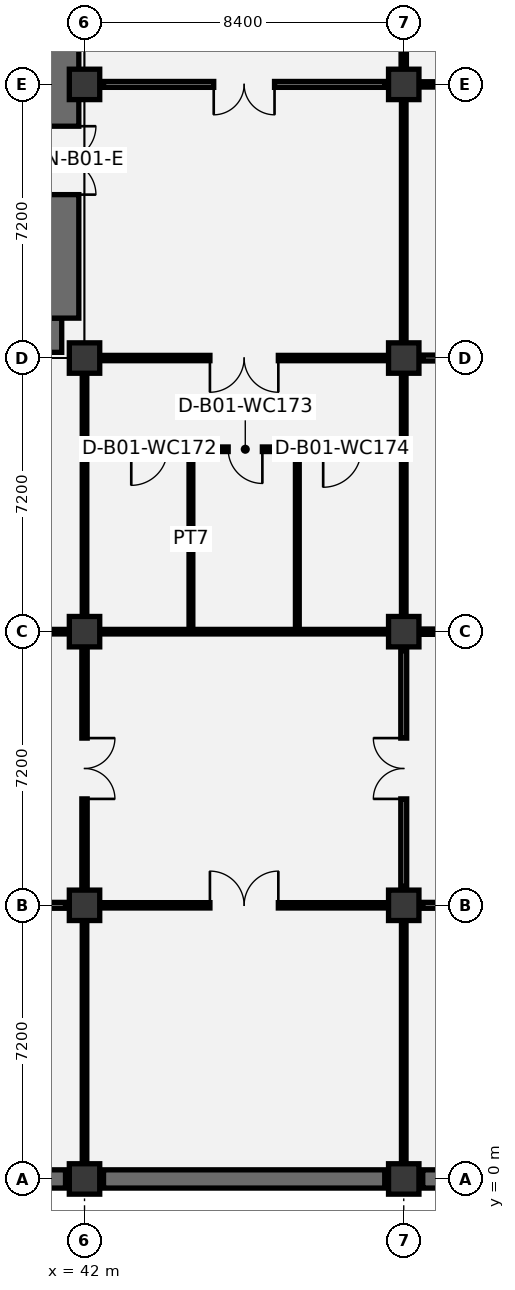
"""IFC4 building model, lengths in metres.
Left out: names, types, materials, properties, quantities, classifications, styles, units other than length and angle.
Written with IfcOpenShell. Run it as: python <this file> out.ifc"""

import sys

from ifc_helpers import new_model, si_unit, direction, frame, frame_2d, origin, origin_2d, place, context, subcontext, project, spatial, rectangle, extrude, element, fill, save


model = new_model("IFC4")
c1 = context("Model", 3, precision=1e-05, world=origin(), true_north=direction((0.0, 1.0)))
c2 = subcontext(c1, "Body", "Model", "MODEL_VIEW")
j1 = project(units=[si_unit("LENGTHUNIT", "METRE"), si_unit("PLANEANGLEUNIT", "RADIAN")], contexts=[c1])
p1 = place(None, origin())
s1 = spatial("IfcSite", under=j1, at=p1, CompositionType="ELEMENT")
p2 = place(p1, origin())
s2 = spatial("IfcBuilding", under=s1, at=p2, CompositionType="ELEMENT")
p3 = place(p2, frame((0.0, 0.0, -4.8)))
s3 = spatial("IfcBuildingStorey", under=s2, at=p3, CompositionType="ELEMENT", Elevation=-4.8)
for number, where, z_axis, x_axis in (
    (1, (42.0, 0.0, 0.0), (0.0, 0.0, 1.0), (1.0, 0.0, 0.0)),
    (2, (42.0, 7.2, 0.0), (0.0, 0.0, 1.0), (1.0, 0.0, 0.0)),
    (3, (42.0, 14.4, 0.0), (0.0, 0.0, 1.0), (1.0, 0.0, 0.0)),
    (4, (42.0, 21.6, 0.0), (0.0, 0.0, 1.0), (1.0, 0.0, 0.0)),
    (5, (42.0, 28.8, 0.0), (0.0, 0.0, 1.0), (1.0, 0.0, 0.0)),
    (6, (50.4, 0.0, 0.0), (0.0, 0.0, 1.0), (1.0, 0.0, 0.0)),
    (7, (50.4, 7.2, 0.0), (0.0, 0.0, 1.0), (1.0, 0.0, 0.0)),
    (8, (50.4, 14.4, 0.0), (0.0, 0.0, 1.0), (1.0, 0.0, 0.0)),
    (9, (50.4, 21.6, 0.0), (0.0, 0.0, 1.0), (1.0, 0.0, 0.0)),
    (10, (50.4, 28.8, 0.0), (0.0, 0.0, 1.0), (1.0, 0.0, 0.0)),
):
    element("IfcColumn", number, at=place(p3, frame(where, z_axis=z_axis, x_axis=x_axis)), inside=s3, PredefinedType="COLUMN", context=c2, shape_type="SweptSolid", body=[
        extrude(rectangle(XDim=0.8, YDim=0.8, at=origin_2d()), origin(), (0.0, 0.0, 1.0), 4.8),
    ])
for number, where, z_axis, x_axis in (
    (11, (34.1, 0.0, 0.0), (0.0, 0.0, 1.0), (1.0, 0.0, 0.0)),
    (12, (42.5, 0.0, 0.0), (0.0, 0.0, 1.0), (1.0, 0.0, 0.0)),
):
    element("IfcWall", number, at=place(p3, frame(where, z_axis=z_axis, x_axis=x_axis)), inside=s3, PredefinedType="USERDEFINED", context=c2, shape_type="SweptSolid", body=[
        extrude(rectangle(XDim=7.4, YDim=0.48, at=frame_2d((3.7, 0.0))), origin(), (0.0, 0.0, 1.0), 4.45),
    ])
p4 = place(p3, frame((50.9, 0.0, 0.0), z_axis=(0.0, 0.0, 1.0), x_axis=(1.0, 0.0, 0.0)))
e13 = element("IfcWall", 13, at=p4, inside=s3, PredefinedType="USERDEFINED", context=c2, shape_type="SweptSolid", body=[
    extrude(rectangle(XDim=7.4, YDim=0.48, at=frame_2d((3.7, 0.0))), origin(), (0.0, 0.0, 1.0), 4.45),
])
p5 = place(p3, frame((17.4, 22.2, 0.0), z_axis=(0.0, 0.0, 1.0), x_axis=(1.0, 0.0, 0.0)))
e14 = element("IfcWall", 14, at=p5, inside=s3, PredefinedType="SOLIDWALL", context=c2, shape_type="SweptSolid", body=[
    extrude(rectangle(XDim=24.0, YDim=0.9, at=frame_2d((12.0, 0.0))), origin(), (0.0, 0.0, 1.0), 4.8),
])
p6 = place(p5, frame((2.6, 0.0, 0.85)))
e15 = element("IfcOpeningElement", 15, at=p6, cuts=e14, PredefinedType="OPENING", context=c2, shape_type="SweptSolid", body=[
    extrude(rectangle(XDim=5.2, YDim=2.9, at=frame_2d((2.6, 1.45))), frame((0.0, 0.46, 0.0), z_axis=(0.0, -1.0, 0.0), x_axis=(1.0, 0.0, 0.0)), (0.0, 0.0, 1.0), 0.92),
])
p7 = place(p5, frame((14.8, 0.0, 0.85)))
e16 = element("IfcOpeningElement", 16, at=p7, cuts=e14, PredefinedType="OPENING", context=c2, shape_type="SweptSolid", body=[
    extrude(rectangle(XDim=5.2, YDim=2.9, at=frame_2d((2.6, 1.45))), frame((0.0, 0.46, 0.0), z_axis=(0.0, -1.0, 0.0), x_axis=(1.0, 0.0, 0.0)), (0.0, 0.0, 1.0), 0.92),
])
p8 = place(p3, frame((41.4, 22.65, 0.0), z_axis=(0.0, 0.0, 1.0), x_axis=(0.0, 1.0, 0.0)))
e17 = element("IfcWall", 17, at=p8, inside=s3, PredefinedType="SOLIDWALL", context=c2, shape_type="SweptSolid", body=[
    extrude(rectangle(XDim=12.3, YDim=0.9, at=frame_2d((6.15, 0.0))), origin(), (0.0, 0.0, 1.0), 4.8),
])
p9 = place(p8, frame((3.25, 0.0, 0.0)))
e18 = element("IfcOpeningElement", 18, at=p9, cuts=e17, PredefinedType="OPENING", context=c2, shape_type="SweptSolid", body=[
    extrude(rectangle(XDim=1.8, YDim=2.2, at=frame_2d((0.9, 1.1))), frame((0.0, 0.46, 0.0), z_axis=(0.0, -1.0, 0.0), x_axis=(1.0, 0.0, 0.0)), (0.0, 0.0, 1.0), 0.92),
])
p10 = place(p3, frame((42.15, 19.2, 0.0), z_axis=(0.0, 0.0, 1.0), x_axis=(1.0, 0.0, 0.0)))
e19 = element("IfcWall", 19, at=p10, inside=s3, PredefinedType="PARTITIONING", context=c2, shape_type="SweptSolid", body=[
    extrude(rectangle(XDim=8.1, YDim=0.12, at=frame_2d((4.05, 0.0))), origin(), (0.0, 0.0, 1.0), 4.45),
])
p11 = place(p10, frame((1.08, 0.0, 0.0)))
e20 = element("IfcOpeningElement", 20, at=p11, cuts=e19, PredefinedType="OPENING", context=c2, shape_type="SweptSolid", body=[
    extrude(rectangle(XDim=0.95, YDim=2.1, at=frame_2d((0.475, 1.05))), frame((0.0, 0.07, 0.0), z_axis=(0.0, -1.0, 0.0), x_axis=(1.0, 0.0, 0.0)), (0.0, 0.0, 1.0), 0.14),
])
p12 = place(p10, frame((3.63, 0.0, 0.0)))
e21 = element("IfcOpeningElement", 21, at=p12, cuts=e19, PredefinedType="OPENING", context=c2, shape_type="SweptSolid", body=[
    extrude(rectangle(XDim=0.9, YDim=2.1, at=frame_2d((0.45, 1.05))), frame((0.0, 0.07, 0.0), z_axis=(0.0, -1.0, 0.0), x_axis=(1.0, 0.0, 0.0)), (0.0, 0.0, 1.0), 0.14),
])
p13 = place(p10, frame((6.13, 0.0, 0.0)))
e22 = element("IfcOpeningElement", 22, at=p13, cuts=e19, PredefinedType="OPENING", context=c2, shape_type="SweptSolid", body=[
    extrude(rectangle(XDim=1.0, YDim=2.1, at=frame_2d((0.5, 1.05))), frame((0.0, 0.07, 0.0), z_axis=(0.0, -1.0, 0.0), x_axis=(1.0, 0.0, 0.0)), (0.0, 0.0, 1.0), 0.14),
])
for number, where, z_axis, x_axis in (
    (23, (44.8, 14.55, 0.0), (0.0, 0.0, 1.0), (0.0, 1.0, 0.0)),
    (24, (47.6, 14.55, 0.0), (0.0, 0.0, 1.0), (0.0, 1.0, 0.0)),
):
    element("IfcWall", number, at=place(p3, frame(where, z_axis=z_axis, x_axis=x_axis)), inside=s3, PredefinedType="PARTITIONING", context=c2, shape_type="SweptSolid", body=[
        extrude(rectangle(XDim=4.59, YDim=0.1, at=frame_2d((2.295, 0.0))), origin(), (0.0, 0.0, 1.0), 4.45),
    ])
p14 = place(p3, frame((42.0, 0.5, 0.0), z_axis=(0.0, 0.0, 1.0), x_axis=(0.0, 1.0, 0.0)))
e25 = element("IfcWall", 25, at=p14, inside=s3, PredefinedType="PARTITIONING", context=c2, shape_type="SweptSolid", body=[
    extrude(rectangle(XDim=6.2, YDim=0.12, at=frame_2d((3.1, 0.0))), origin(), (0.0, 0.0, 1.0), 3.645),
])
p15 = place(p3, frame((34.1, 7.2, 0.0), z_axis=(0.0, 0.0, 1.0), x_axis=(1.0, 0.0, 0.0)))
e26 = element("IfcWall", 26, at=p15, inside=s3, PredefinedType="PARTITIONING", context=c2, shape_type="SweptSolid", body=[
    extrude(rectangle(XDim=7.4, YDim=0.155, at=frame_2d((3.7, 0.0))), origin(), (0.0, 0.0, 1.0), 3.545),
])
p16 = place(p15, frame((2.8, 0.0, 0.0)))
e27 = element("IfcOpeningElement", 27, at=p16, cuts=e26, PredefinedType="OPENING", context=c2, shape_type="SweptSolid", body=[
    extrude(rectangle(XDim=1.8, YDim=2.25, at=frame_2d((0.9, 1.125))), frame((0.0, 0.087, 0.0), z_axis=(0.0, -1.0, 0.0), x_axis=(1.0, 0.0, 0.0)), (0.0, 0.0, 1.0), 0.175),
])
p17 = place(p3, frame((42.0, 7.7, 0.0), z_axis=(0.0, 0.0, 1.0), x_axis=(0.0, 1.0, 0.0)))
e28 = element("IfcWall", 28, at=p17, inside=s3, PredefinedType="PARTITIONING", context=c2, shape_type="SweptSolid", body=[
    extrude(rectangle(XDim=6.2, YDim=0.14, at=frame_2d((3.1, 0.0))), origin(), (0.0, 0.0, 1.0), 3.645),
])
p18 = place(p17, frame((2.3, 0.0, 0.0)))
e29 = element("IfcOpeningElement", 29, at=p18, cuts=e28, PredefinedType="OPENING", context=c2, shape_type="SweptSolid", body=[
    extrude(rectangle(XDim=1.6, YDim=2.2, at=frame_2d((0.8, 1.1))), frame((0.0, 0.08, 0.0), z_axis=(0.0, -1.0, 0.0), x_axis=(1.0, 0.0, 0.0)), (0.0, 0.0, 1.0), 0.16),
])
p19 = place(p3, frame((34.1, 14.4, 0.0), z_axis=(0.0, 0.0, 1.0), x_axis=(1.0, 0.0, 0.0)))
e30 = element("IfcWall", 30, at=p19, inside=s3, PredefinedType="PARTITIONING", context=c2, shape_type="SweptSolid", body=[
    extrude(rectangle(XDim=7.4, YDim=0.12, at=frame_2d((3.7, 0.0))), origin(), (0.0, 0.0, 1.0), 3.545),
])
p20 = place(p3, frame((42.0, 14.9, 0.0), z_axis=(0.0, 0.0, 1.0), x_axis=(0.0, 1.0, 0.0)))
e31 = element("IfcWall", 31, at=p20, inside=s3, PredefinedType="PARTITIONING", context=c2, shape_type="SweptSolid", body=[
    extrude(rectangle(XDim=6.2, YDim=0.12, at=frame_2d((3.1, 0.0))), origin(), (0.0, 0.0, 1.0), 3.645),
])
p21 = place(p3, frame((50.4, 0.5, 0.0), z_axis=(0.0, 0.0, 1.0), x_axis=(0.0, 1.0, 0.0)))
e32 = element("IfcWall", 32, at=p21, inside=s3, PredefinedType="PARTITIONING", context=c2, shape_type="SweptSolid", body=[
    extrude(rectangle(XDim=6.2, YDim=0.12, at=frame_2d((3.1, 0.0))), origin(), (0.0, 0.0, 1.0), 3.645),
])
p22 = place(p3, frame((42.5, 7.2, 0.0), z_axis=(0.0, 0.0, 1.0), x_axis=(1.0, 0.0, 0.0)))
e33 = element("IfcWall", 33, at=p22, inside=s3, PredefinedType="PARTITIONING", context=c2, shape_type="SweptSolid", body=[
    extrude(rectangle(XDim=7.4, YDim=0.14, at=frame_2d((3.7, 0.0))), origin(), (0.0, 0.0, 1.0), 3.545),
])
p23 = place(p22, frame((2.8, 0.0, 0.0)))
e34 = element("IfcOpeningElement", 34, at=p23, cuts=e33, PredefinedType="OPENING", context=c2, shape_type="SweptSolid", body=[
    extrude(rectangle(XDim=1.8, YDim=2.25, at=frame_2d((0.9, 1.125))), frame((0.0, 0.08, 0.0), z_axis=(0.0, -1.0, 0.0), x_axis=(1.0, 0.0, 0.0)), (0.0, 0.0, 1.0), 0.16),
])
p24 = place(p3, frame((50.4, 7.7, 0.0), z_axis=(0.0, 0.0, 1.0), x_axis=(0.0, 1.0, 0.0)))
e35 = element("IfcWall", 35, at=p24, inside=s3, PredefinedType="PARTITIONING", context=c2, shape_type="SweptSolid", body=[
    extrude(rectangle(XDim=6.2, YDim=0.155, at=frame_2d((3.1, 0.0))), origin(), (0.0, 0.0, 1.0), 3.645),
])
p25 = place(p24, frame((2.3, 0.0, 0.0)))
e36 = element("IfcOpeningElement", 36, at=p25, cuts=e35, PredefinedType="OPENING", context=c2, shape_type="SweptSolid", body=[
    extrude(rectangle(XDim=1.6, YDim=2.2, at=frame_2d((0.8, 1.1))), frame((0.0, 0.087, 0.0), z_axis=(0.0, -1.0, 0.0), x_axis=(1.0, 0.0, 0.0)), (0.0, 0.0, 1.0), 0.175),
])
p26 = place(p3, frame((42.5, 14.4, 0.0), z_axis=(0.0, 0.0, 1.0), x_axis=(1.0, 0.0, 0.0)))
e37 = element("IfcWall", 37, at=p26, inside=s3, PredefinedType="PARTITIONING", context=c2, shape_type="SweptSolid", body=[
    extrude(rectangle(XDim=7.4, YDim=0.12, at=frame_2d((3.7, 0.0))), origin(), (0.0, 0.0, 1.0), 3.545),
])
p27 = place(p3, frame((50.4, 14.9, 0.0), z_axis=(0.0, 0.0, 1.0), x_axis=(0.0, 1.0, 0.0)))
e38 = element("IfcWall", 38, at=p27, inside=s3, PredefinedType="PARTITIONING", context=c2, shape_type="SweptSolid", body=[
    extrude(rectangle(XDim=6.2, YDim=0.12, at=frame_2d((3.1, 0.0))), origin(), (0.0, 0.0, 1.0), 3.645),
])
p28 = place(p3, frame((42.5, 21.6, 0.0), z_axis=(0.0, 0.0, 1.0), x_axis=(1.0, 0.0, 0.0)))
e39 = element("IfcWall", 39, at=p28, inside=s3, PredefinedType="PARTITIONING", context=c2, shape_type="SweptSolid", body=[
    extrude(rectangle(XDim=7.4, YDim=0.14, at=frame_2d((3.7, 0.0))), origin(), (0.0, 0.0, 1.0), 3.545),
])
p29 = place(p28, frame((2.8, 0.0, 0.0)))
e40 = element("IfcOpeningElement", 40, at=p29, cuts=e39, PredefinedType="OPENING", context=c2, shape_type="SweptSolid", body=[
    extrude(rectangle(XDim=1.8, YDim=2.25, at=frame_2d((0.9, 1.125))), frame((0.0, 0.08, 0.0), z_axis=(0.0, -1.0, 0.0), x_axis=(1.0, 0.0, 0.0)), (0.0, 0.0, 1.0), 0.16),
])
p30 = place(p3, frame((50.4, 22.1, 0.0), z_axis=(0.0, 0.0, 1.0), x_axis=(0.0, 1.0, 0.0)))
e41 = element("IfcWall", 41, at=p30, inside=s3, PredefinedType="PARTITIONING", context=c2, shape_type="SweptSolid", body=[
    extrude(rectangle(XDim=6.2, YDim=0.12, at=frame_2d((3.1, 0.0))), origin(), (0.0, 0.0, 1.0), 3.645),
])
p31 = place(p3, frame((42.5, 28.8, 0.0), z_axis=(0.0, 0.0, 1.0), x_axis=(1.0, 0.0, 0.0)))
e42 = element("IfcWall", 42, at=p31, inside=s3, PredefinedType="PARTITIONING", context=c2, shape_type="SweptSolid", body=[
    extrude(rectangle(XDim=7.4, YDim=0.155, at=frame_2d((3.7, 0.0))), origin(), (0.0, 0.0, 1.0), 3.545),
])
p32 = place(p31, frame((2.9, 0.0, 0.0)))
e43 = element("IfcOpeningElement", 43, at=p32, cuts=e42, PredefinedType="OPENING", context=c2, shape_type="SweptSolid", body=[
    extrude(rectangle(XDim=1.6, YDim=2.2, at=frame_2d((0.8, 1.1))), frame((0.0, 0.087, 0.0), z_axis=(0.0, -1.0, 0.0), x_axis=(1.0, 0.0, 0.0)), (0.0, 0.0, 1.0), 0.175),
])
p33 = place(p3, frame((50.4, 29.3, 0.0), z_axis=(0.0, 0.0, 1.0), x_axis=(0.0, 1.0, 0.0)))
e44 = element("IfcWall", 44, at=p33, inside=s3, PredefinedType="PARTITIONING", context=c2, shape_type="SweptSolid", body=[
    extrude(rectangle(XDim=6.2, YDim=0.14, at=frame_2d((3.1, 0.0))), origin(), (0.0, 0.0, 1.0), 3.645),
])
p34 = place(p33, frame((2.2, 0.0, 0.0)))
e45 = element("IfcOpeningElement", 45, at=p34, cuts=e44, PredefinedType="OPENING", context=c2, shape_type="SweptSolid", body=[
    extrude(rectangle(XDim=1.8, YDim=2.25, at=frame_2d((0.9, 1.125))), frame((0.0, 0.08, 0.0), z_axis=(0.0, -1.0, 0.0), x_axis=(1.0, 0.0, 0.0)), (0.0, 0.0, 1.0), 0.16),
])
p35 = place(p3, frame((50.9, 7.2, 0.0), z_axis=(0.0, 0.0, 1.0), x_axis=(1.0, 0.0, 0.0)))
e46 = element("IfcWall", 46, at=p35, inside=s3, PredefinedType="PARTITIONING", context=c2, shape_type="SweptSolid", body=[
    extrude(rectangle(XDim=7.4, YDim=0.155, at=frame_2d((3.7, 0.0))), origin(), (0.0, 0.0, 1.0), 3.545),
])
p36 = place(p35, frame((2.8, 0.0, 0.0)))
e47 = element("IfcOpeningElement", 47, at=p36, cuts=e46, PredefinedType="OPENING", context=c2, shape_type="SweptSolid", body=[
    extrude(rectangle(XDim=1.8, YDim=2.25, at=frame_2d((0.9, 1.125))), frame((0.0, 0.087, 0.0), z_axis=(0.0, -1.0, 0.0), x_axis=(1.0, 0.0, 0.0)), (0.0, 0.0, 1.0), 0.175),
])
p37 = place(p3, frame((50.9, 14.4, 0.0), z_axis=(0.0, 0.0, 1.0), x_axis=(1.0, 0.0, 0.0)))
e48 = element("IfcWall", 48, at=p37, inside=s3, PredefinedType="PARTITIONING", context=c2, shape_type="SweptSolid", body=[
    extrude(rectangle(XDim=7.4, YDim=0.14, at=frame_2d((3.7, 0.0))), origin(), (0.0, 0.0, 1.0), 3.545),
])
p38 = place(p37, frame((2.9, 0.0, 0.0)))
e49 = element("IfcOpeningElement", 49, at=p38, cuts=e48, PredefinedType="OPENING", context=c2, shape_type="SweptSolid", body=[
    extrude(rectangle(XDim=1.6, YDim=2.2, at=frame_2d((0.8, 1.1))), frame((0.0, 0.08, 0.0), z_axis=(0.0, -1.0, 0.0), x_axis=(1.0, 0.0, 0.0)), (0.0, 0.0, 1.0), 0.16),
])
p39 = place(p3, frame((50.9, 21.6, 0.0), z_axis=(0.0, 0.0, 1.0), x_axis=(1.0, 0.0, 0.0)))
e50 = element("IfcWall", 50, at=p39, inside=s3, PredefinedType="PARTITIONING", context=c2, shape_type="SweptSolid", body=[
    extrude(rectangle(XDim=7.4, YDim=0.155, at=frame_2d((3.7, 0.0))), origin(), (0.0, 0.0, 1.0), 3.545),
])
p40 = place(p39, frame((2.8, 0.0, 0.0)))
e51 = element("IfcOpeningElement", 51, at=p40, cuts=e50, PredefinedType="OPENING", context=c2, shape_type="SweptSolid", body=[
    extrude(rectangle(XDim=1.8, YDim=2.25, at=frame_2d((0.9, 1.125))), frame((0.0, 0.087, 0.0), z_axis=(0.0, -1.0, 0.0), x_axis=(1.0, 0.0, 0.0)), (0.0, 0.0, 1.0), 0.175),
])
p41 = place(p3, frame((50.9, 28.8, 0.0), z_axis=(0.0, 0.0, 1.0), x_axis=(1.0, 0.0, 0.0)))
e52 = element("IfcWall", 52, at=p41, inside=s3, PredefinedType="PARTITIONING", context=c2, shape_type="SweptSolid", body=[
    extrude(rectangle(XDim=7.4, YDim=0.14, at=frame_2d((3.7, 0.0))), origin(), (0.0, 0.0, 1.0), 3.545),
])
p42 = place(p41, frame((2.9, 0.0, 0.0)))
e53 = element("IfcOpeningElement", 53, at=p42, cuts=e52, PredefinedType="OPENING", context=c2, shape_type="SweptSolid", body=[
    extrude(rectangle(XDim=1.6, YDim=2.2, at=frame_2d((0.8, 1.1))), frame((0.0, 0.08, 0.0), z_axis=(0.0, -1.0, 0.0), x_axis=(1.0, 0.0, 0.0)), (0.0, 0.0, 1.0), 0.16),
])
p43 = place(p9, frame((1.8, 0.0, 0.0), z_axis=(0.0, 0.0, 1.0), x_axis=(-1.0, 0.0, 0.0)))
e54 = element("IfcDoor", 54, at=p43, inside=s3, OperationType="DOUBLE_DOOR_SINGLE_SWING", PredefinedType="DOOR", context=c2, shape_type="SweptSolid", body=[
    extrude(rectangle(XDim=1.8, YDim=2.2, at=frame_2d((0.9, 1.1))), frame((0.0, 0.025, 0.0), z_axis=(0.0, -1.0, 0.0), x_axis=(1.0, 0.0, 0.0)), (0.0, 0.0, 1.0), 0.05),
])
fill(e18, e54)
p44 = place(p11, frame((0.95, 0.0, 0.0), z_axis=(0.0, 0.0, 1.0), x_axis=(-1.0, 0.0, 0.0)))
e55 = element("IfcDoor", 55, at=p44, inside=s3, OperationType="SINGLE_SWING_RIGHT", PredefinedType="DOOR", context=c2, shape_type="SweptSolid", body=[
    extrude(rectangle(XDim=0.95, YDim=2.1, at=frame_2d((0.475, 1.05))), frame((0.0, 0.025, 0.0), z_axis=(0.0, -1.0, 0.0), x_axis=(1.0, 0.0, 0.0)), (0.0, 0.0, 1.0), 0.05),
])
fill(e20, e55)
p45 = place(p12, frame((0.9, 0.0, 0.0), z_axis=(0.0, 0.0, 1.0), x_axis=(-1.0, 0.0, 0.0)))
e56 = element("IfcDoor", 56, at=p45, inside=s3, OperationType="SINGLE_SWING_LEFT", PredefinedType="DOOR", context=c2, shape_type="SweptSolid", body=[
    extrude(rectangle(XDim=0.9, YDim=2.1, at=frame_2d((0.45, 1.05))), frame((0.0, 0.025, 0.0), z_axis=(0.0, -1.0, 0.0), x_axis=(1.0, 0.0, 0.0)), (0.0, 0.0, 1.0), 0.05),
])
fill(e21, e56)
p46 = place(p13, frame((1.0, 0.0, 0.0), z_axis=(0.0, 0.0, 1.0), x_axis=(-1.0, 0.0, 0.0)))
e57 = element("IfcDoor", 57, at=p46, inside=s3, OperationType="SINGLE_SWING_RIGHT", PredefinedType="DOOR", context=c2, shape_type="SweptSolid", body=[
    extrude(rectangle(XDim=1.0, YDim=2.1, at=frame_2d((0.5, 1.05))), frame((0.0, 0.025, 0.0), z_axis=(0.0, -1.0, 0.0), x_axis=(1.0, 0.0, 0.0)), (0.0, 0.0, 1.0), 0.05),
])
fill(e22, e57)
p47 = place(p18, frame((1.6, 0.0, 0.0), z_axis=(0.0, 0.0, 1.0), x_axis=(-1.0, 0.0, 0.0)))
e58 = element("IfcDoor", 58, at=p47, inside=s3, OperationType="DOUBLE_DOOR_SINGLE_SWING", PredefinedType="DOOR", context=c2, shape_type="SweptSolid", body=[
    extrude(rectangle(XDim=1.6, YDim=2.2, at=frame_2d((0.8, 1.1))), frame((0.0, 0.025, 0.0), z_axis=(0.0, -1.0, 0.0), x_axis=(1.0, 0.0, 0.0)), (0.0, 0.0, 1.0), 0.05),
])
fill(e29, e58)
p48 = place(p23, origin())
e59 = element("IfcDoor", 59, at=p48, inside=s3, OperationType="DOUBLE_DOOR_SINGLE_SWING", PredefinedType="DOOR", context=c2, shape_type="SweptSolid", body=[
    extrude(rectangle(XDim=1.8, YDim=2.25, at=frame_2d((0.9, 1.125))), frame((0.0, 0.025, 0.0), z_axis=(0.0, -1.0, 0.0), x_axis=(1.0, 0.0, 0.0)), (0.0, 0.0, 1.0), 0.05),
])
fill(e34, e59)
p49 = place(p25, origin())
e60 = element("IfcDoor", 60, at=p49, inside=s3, OperationType="DOUBLE_DOOR_SINGLE_SWING", PredefinedType="DOOR", context=c2, shape_type="SweptSolid", body=[
    extrude(rectangle(XDim=1.6, YDim=2.2, at=frame_2d((0.8, 1.1))), frame((0.0, 0.025, 0.0), z_axis=(0.0, -1.0, 0.0), x_axis=(1.0, 0.0, 0.0)), (0.0, 0.0, 1.0), 0.05),
])
fill(e36, e60)
p50 = place(p29, frame((1.8, 0.0, 0.0), z_axis=(0.0, 0.0, 1.0), x_axis=(-1.0, 0.0, 0.0)))
e61 = element("IfcDoor", 61, at=p50, inside=s3, OperationType="DOUBLE_DOOR_SINGLE_SWING", PredefinedType="DOOR", context=c2, shape_type="SweptSolid", body=[
    extrude(rectangle(XDim=1.8, YDim=2.25, at=frame_2d((0.9, 1.125))), frame((0.0, 0.025, 0.0), z_axis=(0.0, -1.0, 0.0), x_axis=(1.0, 0.0, 0.0)), (0.0, 0.0, 1.0), 0.05),
])
fill(e40, e61)
p51 = place(p32, frame((1.6, 0.0, 0.0), z_axis=(0.0, 0.0, 1.0), x_axis=(-1.0, 0.0, 0.0)))
e62 = element("IfcDoor", 62, at=p51, inside=s3, OperationType="DOUBLE_DOOR_SINGLE_SWING", PredefinedType="DOOR", context=c2, shape_type="SweptSolid", body=[
    extrude(rectangle(XDim=1.6, YDim=2.2, at=frame_2d((0.8, 1.1))), frame((0.0, 0.025, 0.0), z_axis=(0.0, -1.0, 0.0), x_axis=(1.0, 0.0, 0.0)), (0.0, 0.0, 1.0), 0.05),
])
fill(e43, e62)
save(model, sys.argv[1])
